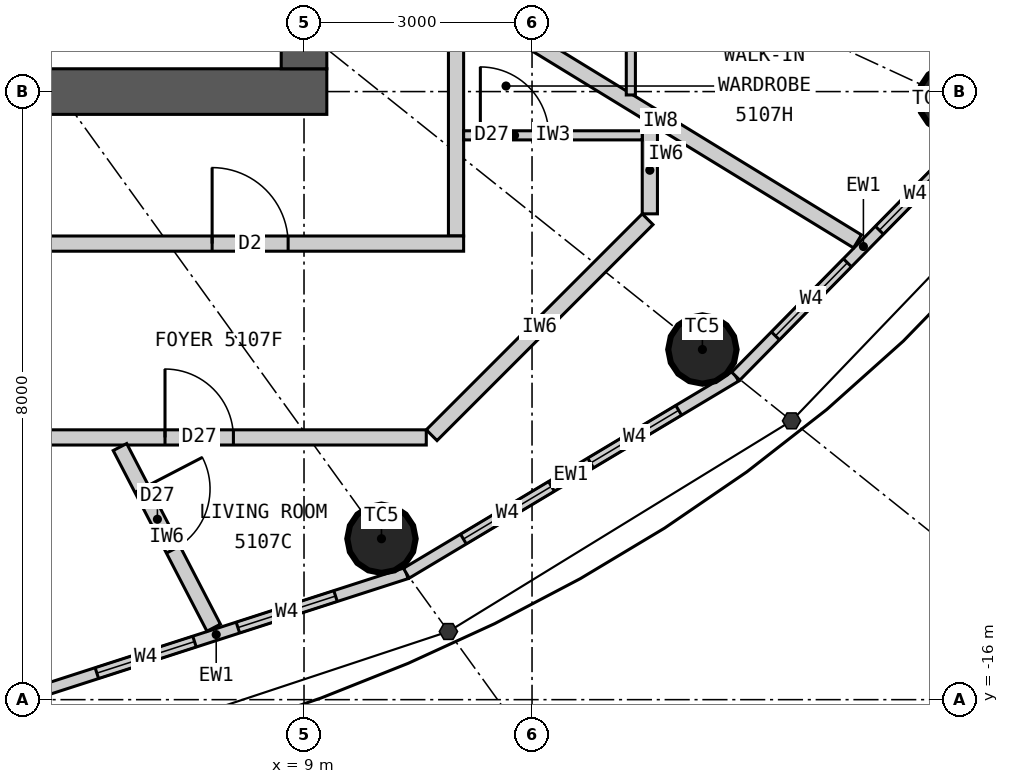
"""IFC4 building model, lengths in metres.
Left out: names, types, materials, properties, quantities, classifications, styles, units other than length and angle.
Written with IfcOpenShell. Run it as: python <this file> out.ifc"""

import sys

from ifc_helpers import new_model, si_unit, direction, frame, frame_2d, origin, origin_2d, place, context, subcontext, project, spatial, rectangle, circle, extrude, element, fill, save


model = new_model("IFC4")
c1 = context("Model", 3, precision=1e-05, world=origin(), true_north=direction((0.0, 1.0)))
c2 = subcontext(c1, "Body", "Model", "MODEL_VIEW")
j1 = project(units=[si_unit("LENGTHUNIT", "METRE"), si_unit("PLANEANGLEUNIT", "RADIAN")], contexts=[c1])
p1 = place(None, origin())
s1 = spatial("IfcSite", under=j1, at=p1, CompositionType="ELEMENT")
p2 = place(p1, origin())
s2 = spatial("IfcBuilding", under=s1, at=p2, CompositionType="ELEMENT")
p3 = place(p2, frame((0.0, 0.0, 192.9)))
s3 = spatial("IfcBuildingStorey", under=s2, at=p3, CompositionType="ELEMENT", Elevation=192.9)
for number, where, z_axis, x_axis in (
    (1, (10.019, -13.883, 0.0), (0.0, 0.0, 1.0), (1.0, 0.0, 0.0)),
    (2, (14.241, -11.393, 0.0), (0.0, 0.0, 1.0), (1.0, 0.0, 0.0)),
    (3, (17.532, -8.098, 0.0), (0.0, 0.0, 1.0), (1.0, 0.0, 0.0)),
):
    element("IfcColumn", number, at=place(p3, frame(where, z_axis=z_axis, x_axis=x_axis)), inside=s3, PredefinedType="COLUMN", context=c2, shape_type="SweptSolid", body=[
        extrude(circle(Radius=0.45, at=origin_2d()), origin(), (0.0, 0.0, 1.0), 3.3),
    ])
p4 = place(p3, frame((9.3, -8.0, 0.0), z_axis=(0.0, 0.0, 1.0), x_axis=(-1.0, 0.0, 0.0)))
e4 = element("IfcWall", 4, at=p4, inside=s3, PredefinedType="SHEAR", context=c2, shape_type="SweptSolid", body=[
    extrude(rectangle(XDim=18.6, YDim=0.6, at=frame_2d((9.3, 0.0))), origin(), (0.0, 0.0, 1.0), 3.3),
])
p5 = place(p4, frame((8.0, 0.0, 0.0)))
e5 = element("IfcOpeningElement", 5, at=p5, cuts=e4, PredefinedType="OPENING", context=c2, shape_type="SweptSolid", body=[
    extrude(rectangle(XDim=1.2, YDim=2.2, at=frame_2d((0.6, 1.1))), frame((0.0, 0.31, 0.0), z_axis=(0.0, -1.0, 0.0), x_axis=(1.0, 0.0, 0.0)), (0.0, 0.0, 1.0), 0.62),
])
p6 = place(p4, frame((15.6, 0.0, 0.0)))
e6 = element("IfcOpeningElement", 6, at=p6, cuts=e4, PredefinedType="OPENING", context=c2, shape_type="SweptSolid", body=[
    extrude(rectangle(XDim=0.9, YDim=2.2, at=frame_2d((0.45, 1.1))), frame((0.0, 0.31, 0.0), z_axis=(0.0, -1.0, 0.0), x_axis=(1.0, 0.0, 0.0)), (0.0, 0.0, 1.0), 0.62),
])
p7 = place(p3, frame((9.0, -7.7, 0.0), z_axis=(0.0, 0.0, 1.0), x_axis=(0.0, 1.0, 0.0)))
e7 = element("IfcWall", 7, at=p7, inside=s3, PredefinedType="SHEAR", context=c2, shape_type="SweptSolid", body=[
    extrude(rectangle(XDim=15.4, YDim=0.6, at=frame_2d((7.7, 0.0))), origin(), (0.0, 0.0, 1.0), 3.3),
])
p8 = place(p7, frame((6.8, 0.0, 0.0)))
e8 = element("IfcOpeningElement", 8, at=p8, cuts=e7, PredefinedType="OPENING", context=c2, shape_type="SweptSolid", body=[
    extrude(rectangle(XDim=1.8, YDim=2.2, at=frame_2d((0.9, 1.1))), frame((0.0, 0.31, 0.0), z_axis=(0.0, -1.0, 0.0), x_axis=(1.0, 0.0, 0.0)), (0.0, 0.0, 1.0), 0.62),
])
p9 = place(p3, frame((5.343, -15.952, 0.0), z_axis=(0.0, 0.0, 1.0), x_axis=(0.951644702515, 0.307200846638, 0.0)))
e9 = element("IfcWall", 9, at=p9, inside=s3, PredefinedType="ELEMENTEDWALL", context=c2, shape_type="SweptSolid", body=[
    extrude(rectangle(XDim=5.258, YDim=0.15, at=frame_2d((2.629, 0.0))), origin(), (0.0, 0.0, 1.0), 3.12),
])
p10 = place(p9, frame((0.979, 0.0, 0.9)))
e10 = element("IfcOpeningElement", 10, at=p10, cuts=e9, PredefinedType="OPENING", context=c2, shape_type="SweptSolid", body=[
    extrude(rectangle(XDim=1.35, YDim=1.9, at=frame_2d((0.675, 0.95))), frame((0.0, 0.085, 0.0), z_axis=(0.0, -1.0, 0.0), x_axis=(1.0, 0.0, 0.0)), (0.0, 0.0, 1.0), 0.17),
])
p11 = place(p9, frame((2.929, 0.0, 0.9)))
e11 = element("IfcOpeningElement", 11, at=p11, cuts=e9, PredefinedType="OPENING", context=c2, shape_type="SweptSolid", body=[
    extrude(rectangle(XDim=1.35, YDim=1.9, at=frame_2d((0.675, 0.95))), frame((0.0, 0.085, 0.0), z_axis=(0.0, -1.0, 0.0), x_axis=(1.0, 0.0, 0.0)), (0.0, 0.0, 1.0), 0.17),
])
p12 = place(p3, frame((10.346, -14.336, 0.0), z_axis=(0.0, 0.0, 1.0), x_axis=(0.85822150553, 0.513279502265, 0.0)))
e12 = element("IfcWall", 12, at=p12, inside=s3, PredefinedType="ELEMENTEDWALL", context=c2, shape_type="SweptSolid", body=[
    extrude(rectangle(XDim=5.05, YDim=0.15, at=frame_2d((2.525, 0.0))), origin(), (0.0, 0.0, 1.0), 3.12),
])
p13 = place(p12, frame((0.875, 0.0, 0.9)))
e13 = element("IfcOpeningElement", 13, at=p13, cuts=e12, PredefinedType="OPENING", context=c2, shape_type="SweptSolid", body=[
    extrude(rectangle(XDim=1.35, YDim=1.9, at=frame_2d((0.675, 0.95))), frame((0.0, 0.085, 0.0), z_axis=(0.0, -1.0, 0.0), x_axis=(1.0, 0.0, 0.0)), (0.0, 0.0, 1.0), 0.17),
])
p14 = place(p12, frame((2.825, 0.0, 0.9)))
e14 = element("IfcOpeningElement", 14, at=p14, cuts=e12, PredefinedType="OPENING", context=c2, shape_type="SweptSolid", body=[
    extrude(rectangle(XDim=1.35, YDim=1.9, at=frame_2d((0.675, 0.95))), frame((0.0, 0.085, 0.0), z_axis=(0.0, -1.0, 0.0), x_axis=(1.0, 0.0, 0.0)), (0.0, 0.0, 1.0), 0.17),
])
p15 = place(p3, frame((14.68, -11.744, 0.0), z_axis=(0.0, 0.0, 1.0), x_axis=(0.701527379618, 0.712642501993, 0.0)))
e15 = element("IfcWall", 15, at=p15, inside=s3, PredefinedType="ELEMENTEDWALL", context=c2, shape_type="SweptSolid", body=[
    extrude(rectangle(XDim=4.788, YDim=0.15, at=frame_2d((2.394, 0.0))), origin(), (0.0, 0.0, 1.0), 3.12),
])
p16 = place(p15, frame((0.744, 0.0, 0.9)))
e16 = element("IfcOpeningElement", 16, at=p16, cuts=e15, PredefinedType="OPENING", context=c2, shape_type="SweptSolid", body=[
    extrude(rectangle(XDim=1.35, YDim=1.9, at=frame_2d((0.675, 0.95))), frame((0.0, 0.085, 0.0), z_axis=(0.0, -1.0, 0.0), x_axis=(1.0, 0.0, 0.0)), (0.0, 0.0, 1.0), 0.17),
])
p17 = place(p15, frame((2.694, 0.0, 0.9)))
e17 = element("IfcOpeningElement", 17, at=p17, cuts=e15, PredefinedType="OPENING", context=c2, shape_type="SweptSolid", body=[
    extrude(rectangle(XDim=1.35, YDim=1.9, at=frame_2d((0.675, 0.95))), frame((0.0, 0.085, 0.0), z_axis=(0.0, -1.0, 0.0), x_axis=(1.0, 0.0, 0.0)), (0.0, 0.0, 1.0), 0.17),
])
p18 = place(p3, frame((11.0, -9.9, 0.0), z_axis=(0.0, 0.0, 1.0), x_axis=(0.0, 1.0, 0.0)))
e18 = element("IfcWall", 18, at=p18, inside=s3, PredefinedType="PARTITIONING", context=c2, shape_type="SweptSolid", body=[
    extrude(rectangle(XDim=19.8, YDim=0.2, at=frame_2d((9.9, 0.0))), origin(), (0.0, 0.0, 1.0), 3.12),
])
p19 = place(p18, frame((11.486, 0.0, 0.0)))
e19 = element("IfcOpeningElement", 19, at=p19, cuts=e18, PredefinedType="OPENING", context=c2, shape_type="SweptSolid", body=[
    extrude(rectangle(XDim=1.0, YDim=2.2, at=frame_2d((0.5, 1.1))), frame((0.0, 0.11, 0.0), z_axis=(0.0, -1.0, 0.0), x_axis=(1.0, 0.0, 0.0)), (0.0, 0.0, 1.0), 0.22),
])
p20 = place(p18, frame((18.645, 0.0, 0.0)))
e20 = element("IfcOpeningElement", 20, at=p20, cuts=e18, PredefinedType="OPENING", context=c2, shape_type="SweptSolid", body=[
    extrude(rectangle(XDim=1.0, YDim=2.2, at=frame_2d((0.5, 1.1))), frame((0.0, 0.11, 0.0), z_axis=(0.0, -1.0, 0.0), x_axis=(1.0, 0.0, 0.0)), (0.0, 0.0, 1.0), 0.22),
])
p21 = place(p18, frame((5.668, 0.0, 0.0)))
e21 = element("IfcOpeningElement", 21, at=p21, cuts=e18, PredefinedType="OPENING", context=c2, shape_type="SweptSolid", body=[
    extrude(rectangle(XDim=1.6, YDim=2.2, at=frame_2d((0.8, 1.1))), frame((0.0, 0.11, 0.0), z_axis=(0.0, -1.0, 0.0), x_axis=(1.0, 0.0, 0.0)), (0.0, 0.0, 1.0), 0.22),
])
p22 = place(p3, frame((11.1, -10.0, 0.0), z_axis=(0.0, 0.0, 1.0), x_axis=(-1.0, 0.0, 0.0)))
e22 = element("IfcWall", 22, at=p22, inside=s3, PredefinedType="PARTITIONING", context=c2, shape_type="SweptSolid", body=[
    extrude(rectangle(XDim=22.2, YDim=0.2, at=frame_2d((11.1, 0.0))), origin(), (0.0, 0.0, 1.0), 3.12),
])
p23 = place(p22, frame((18.864, 0.0, 0.0)))
e23 = element("IfcOpeningElement", 23, at=p23, cuts=e22, PredefinedType="OPENING", context=c2, shape_type="SweptSolid", body=[
    extrude(rectangle(XDim=1.0, YDim=2.2, at=frame_2d((0.5, 1.1))), frame((0.0, 0.11, 0.0), z_axis=(0.0, -1.0, 0.0), x_axis=(1.0, 0.0, 0.0)), (0.0, 0.0, 1.0), 0.22),
])
p24 = place(p22, frame((2.309, 0.0, 0.0)))
e24 = element("IfcOpeningElement", 24, at=p24, cuts=e22, PredefinedType="OPENING", context=c2, shape_type="SweptSolid", body=[
    extrude(rectangle(XDim=1.0, YDim=2.2, at=frame_2d((0.5, 1.1))), frame((0.0, 0.11, 0.0), z_axis=(0.0, -1.0, 0.0), x_axis=(1.0, 0.0, 0.0)), (0.0, 0.0, 1.0), 0.22),
])
p25 = place(p3, frame((11.1, -6.797, 0.0), z_axis=(0.0, 0.0, 1.0), x_axis=(0.852799818179, -0.522237943963, 0.0)))
e25 = element("IfcWall", 25, at=p25, inside=s3, PredefinedType="PARTITIONING", context=c2, shape_type="SweptSolid", body=[
    extrude(rectangle(XDim=6.077, YDim=0.2, at=frame_2d((3.039, 0.0))), origin(), (0.0, 0.0, 1.0), 3.12),
])
p26 = place(p3, frame((0.101, -12.55, 0.0), z_axis=(0.0, 0.0, 1.0), x_axis=(1.0, 0.0, 0.0)))
e26 = element("IfcWall", 26, at=p26, inside=s3, PredefinedType="PARTITIONING", context=c2, shape_type="SweptSolid", body=[
    extrude(rectangle(XDim=10.508, YDim=0.2, at=frame_2d((5.254, 0.0))), origin(), (0.0, 0.0, 1.0), 3.12),
])
p27 = place(p26, frame((1.4, 0.0, 0.0)))
e27 = element("IfcOpeningElement", 27, at=p27, cuts=e26, PredefinedType="OPENING", context=c2, shape_type="SweptSolid", body=[
    extrude(rectangle(XDim=0.8, YDim=2.1, at=frame_2d((0.4, 1.05))), frame((0.0, 0.11, 0.0), z_axis=(0.0, -1.0, 0.0), x_axis=(1.0, 0.0, 0.0)), (0.0, 0.0, 1.0), 0.22),
])
p28 = place(p26, frame((7.07, 0.0, 0.0)))
e28 = element("IfcOpeningElement", 28, at=p28, cuts=e26, PredefinedType="OPENING", context=c2, shape_type="SweptSolid", body=[
    extrude(rectangle(XDim=0.9, YDim=2.1, at=frame_2d((0.45, 1.05))), frame((0.0, 0.11, 0.0), z_axis=(0.0, -1.0, 0.0), x_axis=(1.0, 0.0, 0.0)), (0.0, 0.0, 1.0), 0.22),
])
p29 = place(p3, frame((10.679, -12.521, 0.0), z_axis=(0.0, 0.0, 1.0), x_axis=(0.707106781187, 0.707106781187, 0.0)))
e29 = element("IfcWall", 29, at=p29, inside=s3, PredefinedType="PARTITIONING", context=c2, shape_type="SweptSolid", body=[
    extrude(rectangle(XDim=4.019, YDim=0.2, at=frame_2d((2.009, 0.0))), origin(), (0.0, 0.0, 1.0), 3.12),
])
p30 = place(p3, frame((13.55, -9.609, 0.0), z_axis=(0.0, 0.0, 1.0), x_axis=(0.0, 1.0, 0.0)))
e30 = element("IfcWall", 30, at=p30, inside=s3, PredefinedType="PARTITIONING", context=c2, shape_type="SweptSolid", body=[
    extrude(rectangle(XDim=1.148, YDim=0.2, at=frame_2d((0.574, 0.0))), origin(), (0.0, 0.0, 1.0), 3.12),
])
p31 = place(p3, frame((6.578, -12.677, 0.0), z_axis=(0.0, 0.0, 1.0), x_axis=(0.460620531465, -0.887597164255, 0.0)))
e31 = element("IfcWall", 31, at=p31, inside=s3, PredefinedType="PARTITIONING", context=c2, shape_type="SweptSolid", body=[
    extrude(rectangle(XDim=2.678, YDim=0.2, at=frame_2d((1.339, 0.0))), origin(), (0.0, 0.0, 1.0), 3.12),
])
p32 = place(p31, frame((0.62, 0.0, 0.0)))
e32 = element("IfcOpeningElement", 32, at=p32, cuts=e31, PredefinedType="OPENING", context=c2, shape_type="SweptSolid", body=[
    extrude(rectangle(XDim=0.9, YDim=2.1, at=frame_2d((0.45, 1.05))), frame((0.0, 0.11, 0.0), z_axis=(0.0, -1.0, 0.0), x_axis=(1.0, 0.0, 0.0)), (0.0, 0.0, 1.0), 0.22),
])
p33 = place(p3, frame((11.1, -8.576, 0.0), z_axis=(0.0, 0.0, 1.0), x_axis=(1.0, 0.0, 0.0)))
e33 = element("IfcWall", 33, at=p33, inside=s3, PredefinedType="PARTITIONING", context=c2, shape_type="SweptSolid", body=[
    extrude(rectangle(XDim=2.35, YDim=0.12, at=frame_2d((1.175, 0.0))), origin(), (0.0, 0.0, 1.0), 3.12),
])
p34 = place(p33, frame((0.22, 0.0, 0.0)))
e34 = element("IfcOpeningElement", 34, at=p34, cuts=e33, PredefinedType="OPENING", context=c2, shape_type="SweptSolid", body=[
    extrude(rectangle(XDim=0.9, YDim=2.1, at=frame_2d((0.45, 1.05))), frame((0.0, 0.07, 0.0), z_axis=(0.0, -1.0, 0.0), x_axis=(1.0, 0.0, 0.0)), (0.0, 0.0, 1.0), 0.14),
])
p35 = place(p3, frame((13.3, -8.044, 0.0), z_axis=(0.0, 0.0, 1.0), x_axis=(0.0, 1.0, 0.0)))
e35 = element("IfcWall", 35, at=p35, inside=s3, PredefinedType="PARTITIONING", context=c2, shape_type="SweptSolid", body=[
    extrude(rectangle(XDim=3.687, YDim=0.12, at=frame_2d((1.844, 0.0))), origin(), (0.0, 0.0, 1.0), 3.12),
])
p36 = place(p10, origin())
e36 = element("IfcWindow", 36, at=p36, inside=s3, PartitioningType="SINGLE_PANEL", PredefinedType="WINDOW", context=c2, shape_type="SweptSolid", body=[
    extrude(rectangle(XDim=1.35, YDim=1.9, at=frame_2d((0.675, 0.95))), frame((0.0, 0.03, 0.0), z_axis=(0.0, -1.0, 0.0), x_axis=(1.0, 0.0, 0.0)), (0.0, 0.0, 1.0), 0.06),
])
fill(e10, e36)
p37 = place(p11, origin())
e37 = element("IfcWindow", 37, at=p37, inside=s3, PartitioningType="SINGLE_PANEL", PredefinedType="WINDOW", context=c2, shape_type="SweptSolid", body=[
    extrude(rectangle(XDim=1.35, YDim=1.9, at=frame_2d((0.675, 0.95))), frame((0.0, 0.03, 0.0), z_axis=(0.0, -1.0, 0.0), x_axis=(1.0, 0.0, 0.0)), (0.0, 0.0, 1.0), 0.06),
])
fill(e11, e37)
p38 = place(p13, origin())
e38 = element("IfcWindow", 38, at=p38, inside=s3, PartitioningType="SINGLE_PANEL", PredefinedType="WINDOW", context=c2, shape_type="SweptSolid", body=[
    extrude(rectangle(XDim=1.35, YDim=1.9, at=frame_2d((0.675, 0.95))), frame((0.0, 0.03, 0.0), z_axis=(0.0, -1.0, 0.0), x_axis=(1.0, 0.0, 0.0)), (0.0, 0.0, 1.0), 0.06),
])
fill(e13, e38)
p39 = place(p14, origin())
e39 = element("IfcWindow", 39, at=p39, inside=s3, PartitioningType="SINGLE_PANEL", PredefinedType="WINDOW", context=c2, shape_type="SweptSolid", body=[
    extrude(rectangle(XDim=1.35, YDim=1.9, at=frame_2d((0.675, 0.95))), frame((0.0, 0.03, 0.0), z_axis=(0.0, -1.0, 0.0), x_axis=(1.0, 0.0, 0.0)), (0.0, 0.0, 1.0), 0.06),
])
fill(e14, e39)
p40 = place(p16, origin())
e40 = element("IfcWindow", 40, at=p40, inside=s3, PartitioningType="SINGLE_PANEL", PredefinedType="WINDOW", context=c2, shape_type="SweptSolid", body=[
    extrude(rectangle(XDim=1.35, YDim=1.9, at=frame_2d((0.675, 0.95))), frame((0.0, 0.03, 0.0), z_axis=(0.0, -1.0, 0.0), x_axis=(1.0, 0.0, 0.0)), (0.0, 0.0, 1.0), 0.06),
])
fill(e16, e40)
p41 = place(p17, origin())
e41 = element("IfcWindow", 41, at=p41, inside=s3, PartitioningType="SINGLE_PANEL", PredefinedType="WINDOW", context=c2, shape_type="SweptSolid", body=[
    extrude(rectangle(XDim=1.35, YDim=1.9, at=frame_2d((0.675, 0.95))), frame((0.0, 0.03, 0.0), z_axis=(0.0, -1.0, 0.0), x_axis=(1.0, 0.0, 0.0)), (0.0, 0.0, 1.0), 0.06),
])
fill(e17, e41)
p42 = place(p24, origin())
e42 = element("IfcDoor", 42, at=p42, inside=s3, OperationType="SINGLE_SWING_RIGHT", PredefinedType="DOOR", context=c2, shape_type="SweptSolid", body=[
    extrude(rectangle(XDim=1.0, YDim=2.2, at=frame_2d((0.5, 1.1))), frame((0.0, 0.025, 0.0), z_axis=(0.0, -1.0, 0.0), x_axis=(1.0, 0.0, 0.0)), (0.0, 0.0, 1.0), 0.05),
])
fill(e24, e42)
p43 = place(p34, origin())
e43 = element("IfcDoor", 43, at=p43, inside=s3, OperationType="SINGLE_SWING_LEFT", PredefinedType="DOOR", context=c2, shape_type="SweptSolid", body=[
    extrude(rectangle(XDim=0.9, YDim=2.1, at=frame_2d((0.45, 1.05))), frame((0.0, 0.025, 0.0), z_axis=(0.0, -1.0, 0.0), x_axis=(1.0, 0.0, 0.0)), (0.0, 0.0, 1.0), 0.05),
])
fill(e34, e43)
p44 = place(p28, origin())
e44 = element("IfcDoor", 44, at=p44, inside=s3, OperationType="SINGLE_SWING_LEFT", PredefinedType="DOOR", context=c2, shape_type="SweptSolid", body=[
    extrude(rectangle(XDim=0.9, YDim=2.1, at=frame_2d((0.45, 1.05))), frame((0.0, 0.025, 0.0), z_axis=(0.0, -1.0, 0.0), x_axis=(1.0, 0.0, 0.0)), (0.0, 0.0, 1.0), 0.05),
])
fill(e28, e44)
p45 = place(p32, origin())
e45 = element("IfcDoor", 45, at=p45, inside=s3, OperationType="SINGLE_SWING_LEFT", PredefinedType="DOOR", context=c2, shape_type="SweptSolid", body=[
    extrude(rectangle(XDim=0.9, YDim=2.1, at=frame_2d((0.45, 1.05))), frame((0.0, 0.025, 0.0), z_axis=(0.0, -1.0, 0.0), x_axis=(1.0, 0.0, 0.0)), (0.0, 0.0, 1.0), 0.05),
])
fill(e32, e45)
save(model, sys.argv[1])
